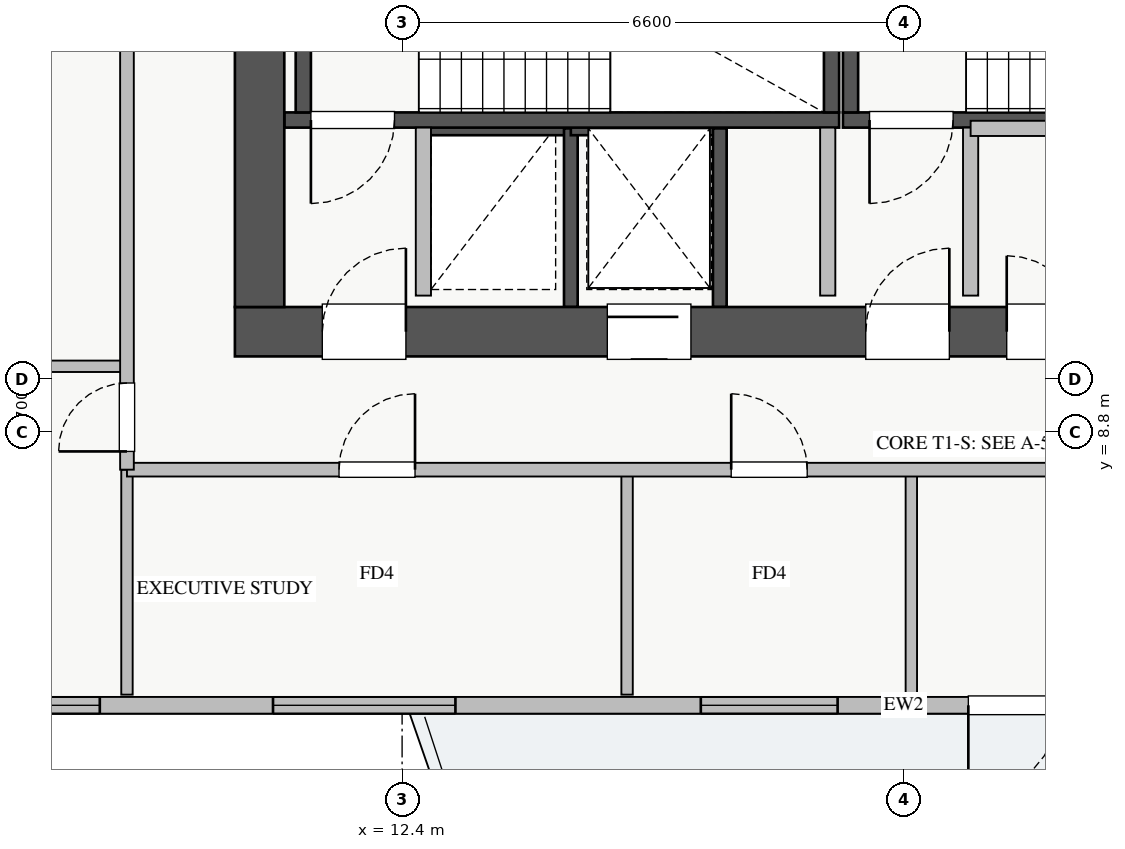
"""IFC4 building model, lengths in metres.
Left out: names, types, materials, properties, quantities, classifications, styles, units other than length and angle.
Written with IfcOpenShell. Run it as: python <this file> out.ifc"""

import sys

from ifc_helpers import new_model, si_unit, direction, frame, frame_2d, origin, place, context, subcontext, project, spatial, rectangle, extrude, source, transform, mapped, element, fill, save


model = new_model("IFC4")
c1 = context("Model", 3, precision=1e-05, world=origin(), true_north=direction((0.0, 1.0)))
c2 = subcontext(c1, "Body", "Model", "MODEL_VIEW")
j1 = project(units=[si_unit("LENGTHUNIT", "METRE"), si_unit("PLANEANGLEUNIT", "RADIAN")], contexts=[c1])
p1 = place(None, origin())
s1 = spatial("IfcSite", under=j1, at=p1, CompositionType="ELEMENT")
p2 = place(p1, origin())
s2 = spatial("IfcBuilding", under=s1, at=p2, CompositionType="ELEMENT")
p3 = place(p2, frame((0.0, 0.0, 173.0)))
s3 = spatial("IfcBuildingStorey", under=s2, at=p3, CompositionType="ELEMENT", Elevation=173.0)
p4 = place(p3, frame((12.68, 12.8, 0.0), z_axis=(0.0, 0.0, 1.0), x_axis=(1.0, 0.0, 0.0)))
e1 = element("IfcWall", 1, at=p4, inside=s3, PredefinedType="SHEAR", context=c2, shape_type="SweptSolid", body=[
    extrude(rectangle(XDim=1.94, YDim=0.18, at=frame_2d((0.97, 0.0))), origin(), (0.0, 0.0, 1.0), 3.0),
])
p5 = place(p3, frame((14.62, 10.45, 0.0), z_axis=(0.0, 0.0, 1.0), x_axis=(0.0, 1.0, 0.0)))
e2 = element("IfcWall", 2, at=p5, inside=s3, PredefinedType="SHEAR", context=c2, shape_type="SweptSolid", body=[
    extrude(rectangle(XDim=2.35, YDim=0.18, at=frame_2d((1.175, 0.0))), origin(), (0.0, 0.0, 1.0), 3.0),
])
p6 = place(p3, frame((14.62, 12.8, 0.0), z_axis=(0.0, 0.0, 1.0), x_axis=(1.0, 0.0, 0.0)))
e3 = element("IfcWall", 3, at=p6, inside=s3, PredefinedType="SHEAR", context=c2, shape_type="SweptSolid", body=[
    extrude(rectangle(XDim=1.96, YDim=0.18, at=frame_2d((0.98, 0.0))), origin(), (0.0, 0.0, 1.0), 3.0),
])
p7 = place(p3, frame((16.58, 10.45, 0.0), z_axis=(0.0, 0.0, 1.0), x_axis=(0.0, 1.0, 0.0)))
e4 = element("IfcWall", 4, at=p7, inside=s3, PredefinedType="SHEAR", context=c2, shape_type="SweptSolid", body=[
    extrude(rectangle(XDim=2.35, YDim=0.18, at=frame_2d((1.175, 0.0))), origin(), (0.0, 0.0, 1.0), 3.0),
])
p8 = place(p3, frame((10.85, 12.91, 0.0), z_axis=(0.0, 0.0, 1.0), x_axis=(1.0, 0.0, 0.0)))
e5 = element("IfcWall", 5, at=p8, inside=s3, PredefinedType="SHEAR", context=c2, shape_type="SweptSolid", body=[
    extrude(rectangle(XDim=7.3, YDim=0.2, at=frame_2d((3.65, 0.0))), origin(), (0.0, 0.0, 1.0), 3.25),
])
p9 = place(p8, frame((0.35, 0.0, 0.0)))
e6 = element("IfcOpeningElement", 6, at=p9, cuts=e5, PredefinedType="OPENING", context=c2, shape_type="SweptSolid", body=[
    extrude(rectangle(XDim=1.1, YDim=2.05, at=frame_2d((0.55, 1.025))), frame((0.0, 0.11, 0.0), z_axis=(0.0, -1.0, 0.0), x_axis=(1.0, 0.0, 0.0)), (0.0, 0.0, 1.0), 0.22),
])
for number, where, z_axis, x_axis in (
    (7, (11.1, 13.01, 0.0), (0.0, 0.0, 1.0), (0.0, 1.0, 0.0)),
    (8, (18.05, 13.01, 0.0), (0.0, 0.0, 1.0), (0.0, 1.0, 0.0)),
):
    element("IfcWall", number, at=place(p3, frame(where, z_axis=z_axis, x_axis=x_axis)), inside=s3, PredefinedType="SHEAR", context=c2, shape_type="SweptSolid", body=[
        extrude(rectangle(XDim=2.94, YDim=0.2, at=frame_2d((1.47, 0.0))), origin(), (0.0, 0.0, 1.0), 3.25),
    ])
p10 = place(p3, frame((18.2, 12.91, 0.0), z_axis=(0.0, 0.0, 1.0), x_axis=(1.0, 0.0, 0.0)))
e9 = element("IfcWall", 9, at=p10, inside=s3, PredefinedType="SHEAR", context=c2, shape_type="SweptSolid", body=[
    extrude(rectangle(XDim=7.15, YDim=0.2, at=frame_2d((3.575, 0.0))), origin(), (0.0, 0.0, 1.0), 3.25),
])
p11 = place(p10, frame((0.35, 0.0, 0.0)))
e10 = element("IfcOpeningElement", 10, at=p11, cuts=e9, PredefinedType="OPENING", context=c2, shape_type="SweptSolid", body=[
    extrude(rectangle(XDim=1.1, YDim=2.05, at=frame_2d((0.55, 1.025))), frame((0.0, 0.11, 0.0), z_axis=(0.0, -1.0, 0.0), x_axis=(1.0, 0.0, 0.0)), (0.0, 0.0, 1.0), 0.22),
])
p12 = place(p3, frame((18.3, 13.01, 0.0), z_axis=(0.0, 0.0, 1.0), x_axis=(0.0, 1.0, 0.0)))
e11 = element("IfcWall", 11, at=p12, inside=s3, PredefinedType="SHEAR", context=c2, shape_type="SweptSolid", body=[
    extrude(rectangle(XDim=2.94, YDim=0.2, at=frame_2d((1.47, 0.0))), origin(), (0.0, 0.0, 1.0), 3.25),
])
p13 = place(p3, frame((10.2, 10.125, 0.0), z_axis=(0.0, 0.0, 1.0), x_axis=(1.0, 0.0, 0.0)))
e12 = element("IfcWall", 12, at=p13, inside=s3, PredefinedType="SHEAR", context=c2, shape_type="SweptSolid", body=[
    extrude(rectangle(XDim=17.6, YDim=0.65, at=frame_2d((8.8, 0.0))), origin(), (0.0, 0.0, 1.0), 3.25),
])
p14 = place(p13, frame((1.15, 0.0, 0.0)))
e13 = element("IfcOpeningElement", 13, at=p14, cuts=e12, PredefinedType="OPENING", context=c2, shape_type="SweptSolid", body=[
    extrude(rectangle(XDim=1.1, YDim=2.05, at=frame_2d((0.55, 1.025))), frame((0.0, 0.335, 0.0), z_axis=(0.0, -1.0, 0.0), x_axis=(1.0, 0.0, 0.0)), (0.0, 0.0, 1.0), 0.67),
])
p15 = place(p13, frame((8.3, 0.0, 0.0)))
e14 = element("IfcOpeningElement", 14, at=p15, cuts=e12, PredefinedType="OPENING", context=c2, shape_type="SweptSolid", body=[
    extrude(rectangle(XDim=1.1, YDim=2.05, at=frame_2d((0.55, 1.025))), frame((0.0, 0.335, 0.0), z_axis=(0.0, -1.0, 0.0), x_axis=(1.0, 0.0, 0.0)), (0.0, 0.0, 1.0), 0.67),
])
p16 = place(p13, frame((4.9, 0.0, 0.0)))
e15 = element("IfcOpeningElement", 15, at=p16, cuts=e12, PredefinedType="OPENING", context=c2, shape_type="SweptSolid", body=[
    extrude(rectangle(XDim=1.1, YDim=2.05, at=frame_2d((0.55, 1.025))), frame((0.0, 0.335, 0.0), z_axis=(0.0, -1.0, 0.0), x_axis=(1.0, 0.0, 0.0)), (0.0, 0.0, 1.0), 0.67),
])
p17 = place(p13, frame((14.74, 0.0, 0.0)))
e16 = element("IfcOpeningElement", 16, at=p17, cuts=e12, PredefinedType="OPENING", context=c2, shape_type="SweptSolid", body=[
    extrude(rectangle(XDim=1.0, YDim=2.05, at=frame_2d((0.5, 1.025))), frame((0.0, 0.335, 0.0), z_axis=(0.0, -1.0, 0.0), x_axis=(1.0, 0.0, 0.0)), (0.0, 0.0, 1.0), 0.67),
])
p18 = place(p13, frame((10.155, 0.0, 0.0)))
e17 = element("IfcOpeningElement", 17, at=p18, cuts=e12, PredefinedType="OPENING", context=c2, shape_type="SweptSolid", body=[
    extrude(rectangle(XDim=1.0, YDim=2.05, at=frame_2d((0.5, 1.025))), frame((0.0, 0.335, 0.0), z_axis=(0.0, -1.0, 0.0), x_axis=(1.0, 0.0, 0.0)), (0.0, 0.0, 1.0), 0.67),
])
p19 = place(p13, frame((11.87, 0.0, 0.0)))
e18 = element("IfcOpeningElement", 18, at=p19, cuts=e12, PredefinedType="OPENING", context=c2, shape_type="SweptSolid", body=[
    extrude(rectangle(XDim=1.0, YDim=2.05, at=frame_2d((0.5, 1.025))), frame((0.0, 0.335, 0.0), z_axis=(0.0, -1.0, 0.0), x_axis=(1.0, 0.0, 0.0)), (0.0, 0.0, 1.0), 0.67),
])
p20 = place(p13, frame((13.46, 0.0, 0.0)))
e19 = element("IfcOpeningElement", 19, at=p20, cuts=e12, PredefinedType="OPENING", context=c2, shape_type="SweptSolid", body=[
    extrude(rectangle(XDim=1.0, YDim=2.05, at=frame_2d((0.5, 1.025))), frame((0.0, 0.335, 0.0), z_axis=(0.0, -1.0, 0.0), x_axis=(1.0, 0.0, 0.0)), (0.0, 0.0, 1.0), 0.67),
])
p21 = place(p3, frame((10.525, 10.45, 0.0), z_axis=(0.0, 0.0, 1.0), x_axis=(0.0, 1.0, 0.0)))
e20 = element("IfcWall", 20, at=p21, inside=s3, PredefinedType="SHEAR", context=c2, shape_type="SweptSolid", body=[
    extrude(rectangle(XDim=5.9, YDim=0.65, at=frame_2d((2.95, 0.0))), origin(), (0.0, 0.0, 1.0), 3.25),
])
p22 = place(p3, frame((6.55, 5.21, 0.0), z_axis=(0.0, 0.0, 1.0), x_axis=(1.0, 0.0, 0.0)))
e21 = element("IfcWall", 21, at=p22, inside=s3, PredefinedType="STANDARD", context=c2, shape_type="SweptSolid", body=[
    extrude(rectangle(XDim=24.9, YDim=0.22, at=frame_2d((12.45, 0.0))), origin(), (0.0, 0.0, 1.0), 2.54),
])
p23 = place(p22, frame((13.3, 0.0, 0.0)))
e22 = element("IfcOpeningElement", 22, at=p23, cuts=e21, PredefinedType="OPENING", context=c2, shape_type="SweptSolid", body=[
    extrude(rectangle(XDim=1.2, YDim=2.1, at=frame_2d((0.6, 1.05))), frame((0.0, 0.12, 0.0), z_axis=(0.0, -1.0, 0.0), x_axis=(1.0, 0.0, 0.0)), (0.0, 0.0, 1.0), 0.24),
])
p24 = place(p22, frame((0.373, 0.0, 0.9)))
e23 = element("IfcOpeningElement", 23, at=p24, cuts=e21, PredefinedType="OPENING", context=c2, shape_type="SweptSolid", body=[
    extrude(rectangle(XDim=1.5, YDim=1.5, at=frame_2d((0.75, 0.75))), frame((0.0, 0.12, 0.0), z_axis=(0.0, -1.0, 0.0), x_axis=(1.0, 0.0, 0.0)), (0.0, 0.0, 1.0), 0.24),
])
p25 = place(p22, frame((9.78, 0.0, 0.9)))
e24 = element("IfcOpeningElement", 24, at=p25, cuts=e21, PredefinedType="OPENING", context=c2, shape_type="SweptSolid", body=[
    extrude(rectangle(XDim=1.8, YDim=1.5, at=frame_2d((0.9, 0.75))), frame((0.0, 0.12, 0.0), z_axis=(0.0, -1.0, 0.0), x_axis=(1.0, 0.0, 0.0)), (0.0, 0.0, 1.0), 0.24),
])
p26 = place(p22, frame((14.813, 0.0, 0.9)))
e25 = element("IfcOpeningElement", 25, at=p26, cuts=e21, PredefinedType="OPENING", context=c2, shape_type="SweptSolid", body=[
    extrude(rectangle(XDim=1.5, YDim=1.45, at=frame_2d((0.75, 0.725))), frame((0.0, 0.12, 0.0), z_axis=(0.0, -1.0, 0.0), x_axis=(1.0, 0.0, 0.0)), (0.0, 0.0, 1.0), 0.24),
])
p27 = place(p22, frame((20.738, 0.0, 0.9)))
e26 = element("IfcOpeningElement", 26, at=p27, cuts=e21, PredefinedType="OPENING", context=c2, shape_type="SweptSolid", body=[
    extrude(rectangle(XDim=2.1, YDim=1.46, at=frame_2d((1.05, 0.73))), frame((0.0, 0.12, 0.0), z_axis=(0.0, -1.0, 0.0), x_axis=(1.0, 0.0, 0.0)), (0.0, 0.0, 1.0), 0.24),
])
p28 = place(p22, frame((4.152, 0.0, 0.9)))
e27 = element("IfcOpeningElement", 27, at=p28, cuts=e21, PredefinedType="OPENING", context=c2, shape_type="SweptSolid", body=[
    extrude(rectangle(XDim=2.4, YDim=1.5, at=frame_2d((1.2, 0.75))), frame((0.0, 0.12, 0.0), z_axis=(0.0, -1.0, 0.0), x_axis=(1.0, 0.0, 0.0)), (0.0, 0.0, 1.0), 0.24),
])
for number, where, z_axis, x_axis in (
    (28, (12.68, 10.6, 0.0), (0.0, 0.0, 1.0), (0.0, 1.0, 0.0)),
    (29, (18.0, 10.6, 0.0), (0.0, 0.0, 1.0), (0.0, 1.0, 0.0)),
    (30, (19.88, 10.6, 0.0), (0.0, 0.0, 1.0), (0.0, 1.0, 0.0)),
):
    element("IfcWall", number, at=place(p3, frame(where, z_axis=z_axis, x_axis=x_axis)), inside=s3, PredefinedType="PARTITIONING", context=c2, shape_type="SweptSolid", body=[
        extrude(rectangle(XDim=2.21, YDim=0.2, at=frame_2d((1.105, 0.0))), origin(), (0.0, 0.0, 1.0), 3.0),
    ])
p29 = place(p3, frame((19.88, 12.8, 0.0), z_axis=(0.0, 0.0, 1.0), x_axis=(1.0, 0.0, 0.0)))
e31 = element("IfcWall", 31, at=p29, inside=s3, PredefinedType="PARTITIONING", context=c2, shape_type="SweptSolid", body=[
    extrude(rectangle(XDim=1.87, YDim=0.2, at=frame_2d((0.935, 0.0))), origin(), (0.0, 0.0, 1.0), 3.0),
])
p30 = place(p3, frame((15.36, 5.35, 0.0), z_axis=(0.0, 0.0, 1.0), x_axis=(0.0, 1.0, 0.0)))
e32 = element("IfcWall", 32, at=p30, inside=s3, PredefinedType="PARTITIONING", context=c2, shape_type="SweptSolid", body=[
    extrude(rectangle(XDim=2.96, YDim=0.15, at=frame_2d((1.48, 0.0))), origin(), (0.0, 0.0, 1.0), 3.0),
])
p31 = place(p3, frame((19.1, 5.35, 0.0), z_axis=(0.0, 0.0, 1.0), x_axis=(0.0, 1.0, 0.0)))
e33 = element("IfcWall", 33, at=p31, inside=s3, PredefinedType="PARTITIONING", context=c2, shape_type="SweptSolid", body=[
    extrude(rectangle(XDim=2.96, YDim=0.15, at=frame_2d((1.48, 0.0))), origin(), (0.0, 0.0, 1.0), 2.701),
])
p32 = place(p3, frame((8.78, 5.35, 0.0), z_axis=(0.0, 0.0, 1.0), x_axis=(0.0, 1.0, 0.0)))
e34 = element("IfcWall", 34, at=p32, inside=s3, PredefinedType="PARTITIONING", context=c2, shape_type="SweptSolid", body=[
    extrude(rectangle(XDim=2.96, YDim=0.15, at=frame_2d((1.48, 0.0))), origin(), (0.0, 0.0, 1.0), 3.0),
])
p33 = place(p3, frame((8.78, 8.31, 0.0), z_axis=(0.0, 0.0, 1.0), x_axis=(1.0, 0.0, 0.0)))
e35 = element("IfcWall", 35, at=p33, inside=s3, PredefinedType="PARTITIONING", context=c2, shape_type="SweptSolid", body=[
    extrude(rectangle(XDim=23.54, YDim=0.18, at=frame_2d((11.77, 0.0))), origin(), (0.0, 0.0, 1.0), 3.0),
])
p34 = place(p33, frame((2.79, 0.0, 0.0)))
e36 = element("IfcOpeningElement", 36, at=p34, cuts=e35, PredefinedType="OPENING", context=c2, shape_type="SweptSolid", body=[
    extrude(rectangle(XDim=1.0, YDim=2.05, at=frame_2d((0.5, 1.025))), frame((0.0, 0.1, 0.0), z_axis=(0.0, -1.0, 0.0), x_axis=(1.0, 0.0, 0.0)), (0.0, 0.0, 1.0), 0.2),
])
p35 = place(p33, frame((7.95, 0.0, 0.0)))
e37 = element("IfcOpeningElement", 37, at=p35, cuts=e35, PredefinedType="OPENING", context=c2, shape_type="SweptSolid", body=[
    extrude(rectangle(XDim=1.0, YDim=2.05, at=frame_2d((0.5, 1.025))), frame((0.0, 0.1, 0.0), z_axis=(0.0, -1.0, 0.0), x_axis=(1.0, 0.0, 0.0)), (0.0, 0.0, 1.0), 0.2),
])
p36 = place(p33, frame((13.36, 0.0, 0.0)))
e38 = element("IfcOpeningElement", 38, at=p36, cuts=e35, PredefinedType="OPENING", context=c2, shape_type="SweptSolid", body=[
    extrude(rectangle(XDim=1.0, YDim=2.05, at=frame_2d((0.5, 1.025))), frame((0.0, 0.1, 0.0), z_axis=(0.0, -1.0, 0.0), x_axis=(1.0, 0.0, 0.0)), (0.0, 0.0, 1.0), 0.2),
])
p37 = place(p33, frame((19.8, 0.0, 0.0)))
e39 = element("IfcOpeningElement", 39, at=p37, cuts=e35, PredefinedType="OPENING", context=c2, shape_type="SweptSolid", body=[
    extrude(rectangle(XDim=1.0, YDim=2.05, at=frame_2d((0.5, 1.025))), frame((0.0, 0.1, 0.0), z_axis=(0.0, -1.0, 0.0), x_axis=(1.0, 0.0, 0.0)), (0.0, 0.0, 1.0), 0.2),
])
p38 = place(p3, frame((2.4, 9.67, 0.0), z_axis=(0.0, 0.0, 1.0), x_axis=(1.0, 0.0, 0.0)))
e40 = element("IfcWall", 40, at=p38, inside=s3, PredefinedType="PARTITIONING", context=c2, shape_type="SweptSolid", body=[
    extrude(rectangle(XDim=6.38, YDim=0.15, at=frame_2d((3.19, 0.0))), origin(), (0.0, 0.0, 1.0), 3.0),
])
p39 = place(p3, frame((8.78, 8.31, 0.0), z_axis=(0.0, 0.0, 1.0), x_axis=(0.0, 1.0, 0.0)))
e41 = element("IfcWall", 41, at=p39, inside=s3, PredefinedType="PARTITIONING", context=c2, shape_type="SweptSolid", body=[
    extrude(rectangle(XDim=29.34, YDim=0.18, at=frame_2d((14.67, 0.0))), origin(), (0.0, 0.0, 1.0), 3.0),
])
p40 = place(p39, frame((28.045, 0.0, 0.0)))
e42 = element("IfcOpeningElement", 42, at=p40, cuts=e41, PredefinedType="OPENING", context=c2, shape_type="SweptSolid", body=[
    extrude(rectangle(XDim=0.9, YDim=2.05, at=frame_2d((0.45, 1.025))), frame((0.0, 0.1, 0.0), z_axis=(0.0, -1.0, 0.0), x_axis=(1.0, 0.0, 0.0)), (0.0, 0.0, 1.0), 0.2),
])
p41 = place(p39, frame((0.24, 0.0, 0.0)))
e43 = element("IfcOpeningElement", 43, at=p41, cuts=e41, PredefinedType="OPENING", context=c2, shape_type="SweptSolid", body=[
    extrude(rectangle(XDim=0.9, YDim=2.05, at=frame_2d((0.45, 1.025))), frame((0.0, 0.1, 0.0), z_axis=(0.0, -1.0, 0.0), x_axis=(1.0, 0.0, 0.0)), (0.0, 0.0, 1.0), 0.2),
])
p42 = place(p39, frame((7.705, 0.0, 0.0)))
e44 = element("IfcOpeningElement", 44, at=p42, cuts=e41, PredefinedType="OPENING", context=c2, shape_type="SweptSolid", body=[
    extrude(rectangle(XDim=1.0, YDim=2.05, at=frame_2d((0.5, 1.025))), frame((0.0, 0.1, 0.0), z_axis=(0.0, -1.0, 0.0), x_axis=(1.0, 0.0, 0.0)), (0.0, 0.0, 1.0), 0.2),
])
p43 = place(p39, frame((17.39, 0.0, 0.0)))
e45 = element("IfcOpeningElement", 45, at=p43, cuts=e41, PredefinedType="OPENING", context=c2, shape_type="SweptSolid", body=[
    extrude(rectangle(XDim=1.0, YDim=2.05, at=frame_2d((0.5, 1.025))), frame((0.0, 0.1, 0.0), z_axis=(0.0, -1.0, 0.0), x_axis=(1.0, 0.0, 0.0)), (0.0, 0.0, 1.0), 0.2),
])
m1 = source(origin(), c2, "Body", "SweptSolid", [
    extrude(rectangle(XDim=1.2, YDim=2.1, at=frame_2d((0.6, 1.05))), frame((0.0, 0.025, 0.0), z_axis=(0.0, -1.0, 0.0), x_axis=(1.0, 0.0, 0.0)), (0.0, 0.0, 1.0), 0.05),
])
p44 = place(p23, frame((1.2, 0.0, 0.0), z_axis=(0.0, 0.0, 1.0), x_axis=(-1.0, 0.0, 0.0)))
e46 = element("IfcDoor", 46, at=p44, inside=s3, OperationType="SINGLE_SWING_LEFT", PredefinedType="DOOR", context=c2, shape_type="MappedRepresentation", body=[
    mapped(m1, transform((0.0, 0.0, 0.0), x_axis=(1.0, 0.0, 0.0), y_axis=(0.0, 1.0, 0.0), z_axis=(0.0, 0.0, 1.0), scale=1.0)),
])
fill(e22, e46)
m2 = source(origin(), c2, "Body", "SweptSolid", [
    extrude(rectangle(XDim=1.5, YDim=1.5, at=frame_2d((0.75, 0.75))), frame((0.0, 0.03, 0.0), z_axis=(0.0, -1.0, 0.0), x_axis=(1.0, 0.0, 0.0)), (0.0, 0.0, 1.0), 0.06),
])
p45 = place(p24, origin())
e47 = element("IfcWindow", 47, at=p45, inside=s3, PartitioningType="TRIPLE_PANEL_VERTICAL", PredefinedType="WINDOW", context=c2, shape_type="MappedRepresentation", body=[
    mapped(m2, transform((0.0, 0.0, 0.0), x_axis=(1.0, 0.0, 0.0), y_axis=(0.0, 1.0, 0.0), z_axis=(0.0, 0.0, 1.0), scale=1.0)),
])
fill(e23, e47)
m3 = source(origin(), c2, "Body", "SweptSolid", [
    extrude(rectangle(XDim=1.8, YDim=1.5, at=frame_2d((0.9, 0.75))), frame((0.0, 0.03, 0.0), z_axis=(0.0, -1.0, 0.0), x_axis=(1.0, 0.0, 0.0)), (0.0, 0.0, 1.0), 0.06),
])
p46 = place(p25, origin())
e48 = element("IfcWindow", 48, at=p46, inside=s3, PartitioningType="DOUBLE_PANEL_VERTICAL", PredefinedType="WINDOW", context=c2, shape_type="MappedRepresentation", body=[
    mapped(m3, transform((0.0, 0.0, 0.0), x_axis=(1.0, 0.0, 0.0), y_axis=(0.0, 1.0, 0.0), z_axis=(0.0, 0.0, 1.0), scale=1.0)),
])
fill(e24, e48)
m4 = source(origin(), c2, "Body", "SweptSolid", [
    extrude(rectangle(XDim=1.1, YDim=2.05, at=frame_2d((0.55, 1.025))), frame((0.0, 0.025, 0.0), z_axis=(0.0, -1.0, 0.0), x_axis=(1.0, 0.0, 0.0)), (0.0, 0.0, 1.0), 0.05),
])
p47 = place(p14, origin())
e49 = element("IfcDoor", 49, at=p47, inside=s3, OperationType="SINGLE_SWING_RIGHT", PredefinedType="DOOR", context=c2, shape_type="MappedRepresentation", body=[
    mapped(m4, transform((0.0, 0.0, 0.0), x_axis=(1.0, 0.0, 0.0), y_axis=(0.0, 1.0, 0.0), z_axis=(0.0, 0.0, 1.0), scale=1.0)),
])
fill(e13, e49)
p48 = place(p9, frame((1.1, 0.0, 0.0), z_axis=(0.0, 0.0, 1.0), x_axis=(-1.0, 0.0, 0.0)))
e50 = element("IfcDoor", 50, at=p48, inside=s3, OperationType="SINGLE_SWING_LEFT", PredefinedType="DOOR", context=c2, shape_type="MappedRepresentation", body=[
    mapped(m4, transform((0.0, 0.0, 0.0), x_axis=(1.0, 0.0, 0.0), y_axis=(0.0, 1.0, 0.0), z_axis=(0.0, 0.0, 1.0), scale=1.0)),
])
fill(e6, e50)
p49 = place(p15, origin())
e51 = element("IfcDoor", 51, at=p49, inside=s3, OperationType="SINGLE_SWING_RIGHT", PredefinedType="DOOR", context=c2, shape_type="MappedRepresentation", body=[
    mapped(m4, transform((0.0, 0.0, 0.0), x_axis=(1.0, 0.0, 0.0), y_axis=(0.0, 1.0, 0.0), z_axis=(0.0, 0.0, 1.0), scale=1.0)),
])
fill(e14, e51)
p50 = place(p11, frame((1.1, 0.0, 0.0), z_axis=(0.0, 0.0, 1.0), x_axis=(-1.0, 0.0, 0.0)))
e52 = element("IfcDoor", 52, at=p50, inside=s3, OperationType="SINGLE_SWING_LEFT", PredefinedType="DOOR", context=c2, shape_type="MappedRepresentation", body=[
    mapped(m4, transform((0.0, 0.0, 0.0), x_axis=(1.0, 0.0, 0.0), y_axis=(0.0, 1.0, 0.0), z_axis=(0.0, 0.0, 1.0), scale=1.0)),
])
fill(e10, e52)
p51 = place(p16, origin())
e53 = element("IfcDoor", 53, at=p51, inside=s3, OperationType="SLIDING_TO_RIGHT", PredefinedType="DOOR", context=c2, shape_type="MappedRepresentation", body=[
    mapped(m4, transform((0.0, 0.0, 0.0), x_axis=(1.0, 0.0, 0.0), y_axis=(0.0, 1.0, 0.0), z_axis=(0.0, 0.0, 1.0), scale=1.0)),
])
fill(e15, e53)
m5 = source(origin(), c2, "Body", "SweptSolid", [
    extrude(rectangle(XDim=1.0, YDim=2.05, at=frame_2d((0.5, 1.025))), frame((0.0, 0.025, 0.0), z_axis=(0.0, -1.0, 0.0), x_axis=(1.0, 0.0, 0.0)), (0.0, 0.0, 1.0), 0.05),
])
p52 = place(p18, origin())
e54 = element("IfcDoor", 54, at=p52, inside=s3, OperationType="SINGLE_SWING_LEFT", PredefinedType="DOOR", context=c2, shape_type="MappedRepresentation", body=[
    mapped(m5, transform((0.0, 0.0, 0.0), x_axis=(1.0, 0.0, 0.0), y_axis=(0.0, 1.0, 0.0), z_axis=(0.0, 0.0, 1.0), scale=1.0)),
])
fill(e17, e54)
p53 = place(p34, origin())
e55 = element("IfcDoor", 55, at=p53, inside=s3, OperationType="SINGLE_SWING_RIGHT", PredefinedType="DOOR", context=c2, shape_type="MappedRepresentation", body=[
    mapped(m5, transform((0.0, 0.0, 0.0), x_axis=(1.0, 0.0, 0.0), y_axis=(0.0, 1.0, 0.0), z_axis=(0.0, 0.0, 1.0), scale=1.0)),
])
fill(e36, e55)
p54 = place(p35, origin())
e56 = element("IfcDoor", 56, at=p54, inside=s3, OperationType="SINGLE_SWING_LEFT", PredefinedType="DOOR", context=c2, shape_type="MappedRepresentation", body=[
    mapped(m5, transform((0.0, 0.0, 0.0), x_axis=(1.0, 0.0, 0.0), y_axis=(0.0, 1.0, 0.0), z_axis=(0.0, 0.0, 1.0), scale=1.0)),
])
fill(e37, e56)
m6 = source(origin(), c2, "Body", "SweptSolid", [
    extrude(rectangle(XDim=0.9, YDim=2.05, at=frame_2d((0.45, 1.025))), frame((0.0, 0.025, 0.0), z_axis=(0.0, -1.0, 0.0), x_axis=(1.0, 0.0, 0.0)), (0.0, 0.0, 1.0), 0.05),
])
p55 = place(p41, origin())
e57 = element("IfcDoor", 57, at=p55, inside=s3, OperationType="SINGLE_SWING_LEFT", PredefinedType="DOOR", context=c2, shape_type="MappedRepresentation", body=[
    mapped(m6, transform((0.0, 0.0, 0.0), x_axis=(1.0, 0.0, 0.0), y_axis=(0.0, 1.0, 0.0), z_axis=(0.0, 0.0, 1.0), scale=1.0)),
])
fill(e43, e57)
m7 = source(origin(), c2, "Body", "SweptSolid", [
    extrude(rectangle(XDim=2.4, YDim=1.5, at=frame_2d((1.2, 0.75))), frame((0.0, 0.03, 0.0), z_axis=(0.0, -1.0, 0.0), x_axis=(1.0, 0.0, 0.0)), (0.0, 0.0, 1.0), 0.06),
])
p56 = place(p28, origin())
e58 = element("IfcWindow", 58, at=p56, inside=s3, PartitioningType="TRIPLE_PANEL_VERTICAL", PredefinedType="WINDOW", context=c2, shape_type="MappedRepresentation", body=[
    mapped(m7, transform((0.0, 0.0, 0.0), x_axis=(1.0, 0.0, 0.0), y_axis=(0.0, 1.0, 0.0), z_axis=(0.0, 0.0, 1.0), scale=1.0)),
])
fill(e27, e58)
save(model, sys.argv[1])
